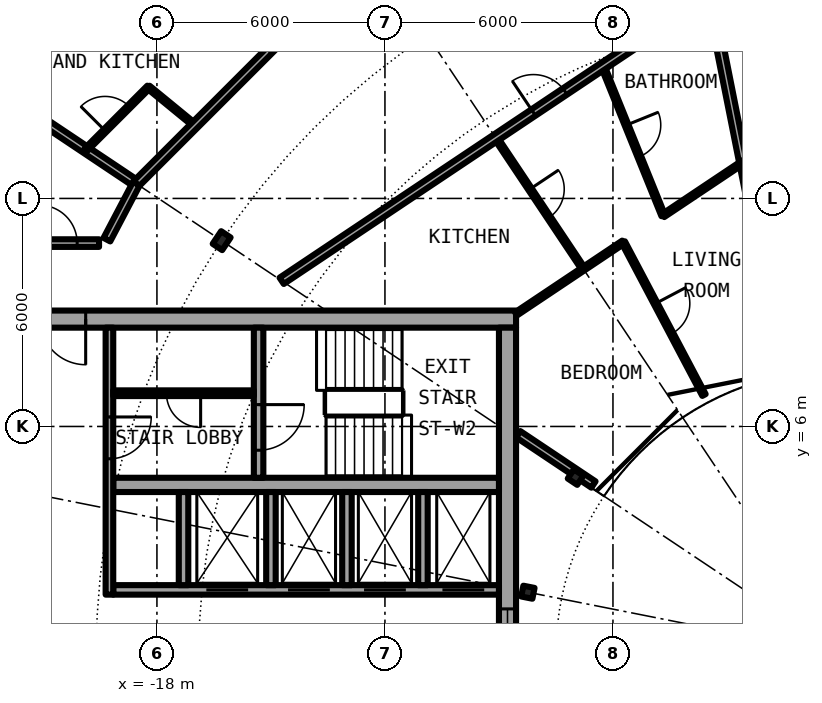
"""IFC4 building model, lengths in metres.
Left out: names, types, materials, properties, quantities, classifications, styles, units other than length and angle.
Written with IfcOpenShell. Run it as: python <this file> out.ifc"""

import sys

from ifc_helpers import new_model, si_unit, direction, frame, frame_2d, origin, origin_2d, place, context, subcontext, project, spatial, rectangle, i_section, extrude, element, fill, save


model = new_model("IFC4")
c1 = context("Model", 3, precision=1e-05, world=origin(), true_north=direction((0.0, 1.0)))
c2 = subcontext(c1, "Body", "Model", "MODEL_VIEW")
j1 = project(units=[si_unit("LENGTHUNIT", "METRE"), si_unit("PLANEANGLEUNIT", "RADIAN")], contexts=[c1])
p1 = place(None, origin())
s1 = spatial("IfcSite", under=j1, at=p1, CompositionType="ELEMENT")
p2 = place(p1, origin())
s2 = spatial("IfcBuilding", under=s1, at=p2, CompositionType="ELEMENT")
p3 = place(p2, frame((0.0, 0.0, 199.35)))
s3 = spatial("IfcBuildingStorey", under=s2, at=p3, CompositionType="ELEMENT", Elevation=199.35)
p4 = place(p3, frame((-16.297, 10.889, 0.0), z_axis=(0.0, 0.0, 1.0), x_axis=(-0.831469612303, 0.55557023302, 0.0)))
e1 = element("IfcColumn", 1, at=p4, inside=s3, PredefinedType="COLUMN", context=c2, shape_type="SweptSolid", body=[
    extrude(i_section(OverallWidth=0.3, OverallDepth=0.4, WebThickness=0.013, FlangeThickness=0.024, FilletRadius=0.027, at=origin_2d()), origin(), (0.0, 0.0, 1.0), 3.05),
])
for number, where, z_axis, x_axis in (
    (2, (-6.984, 4.667, 0.0), (0.0, 0.0, 1.0), (-0.831, 0.556, 0.0)),
    (3, (-8.239, 1.639, 0.0), (0.0, 0.0, 1.0), (-0.981, 0.195, 0.0)),
):
    element("IfcColumn", number, at=place(p3, frame(where, z_axis=z_axis, x_axis=x_axis)), inside=s3, PredefinedType="COLUMN", context=c2, shape_type="SweptSolid", body=[
        extrude(i_section(OverallWidth=0.3, OverallDepth=0.29, WebThickness=0.009, FlangeThickness=0.014, FilletRadius=0.027, at=origin_2d()), origin(), (0.0, 0.0, 1.0), 3.05),
    ])
p5 = place(p3, frame((-19.304, 19.304, 0.0), z_axis=(0.0, 0.0, 1.0), x_axis=(-0.634382322723, -0.773019449054, 0.0)))
e4 = element("IfcWall", 4, at=p5, inside=s3, PredefinedType="SOLIDWALL", context=c2, shape_type="SweptSolid", body=[
    extrude(rectangle(XDim=5.352, YDim=0.25, at=frame_2d((2.676, 0.0))), origin(), (0.0, 0.0, 1.0), 2.7),
])
p6 = place(p5, frame((0.441, 0.0, 0.3)))
e5 = element("IfcOpeningElement", 5, at=p6, cuts=e4, PredefinedType="OPENING", context=c2, shape_type="SweptSolid", body=[
    extrude(rectangle(XDim=1.8, YDim=2.1, at=frame_2d((0.9, 1.05))), frame((0.0, 0.135, 0.0), z_axis=(0.0, -1.0, 0.0), x_axis=(1.0, 0.0, 0.0)), (0.0, 0.0, 1.0), 0.27),
])
p7 = place(p5, frame((3.51, 0.0, 0.0)))
e6 = element("IfcOpeningElement", 6, at=p7, cuts=e4, PredefinedType="OPENING", context=c2, shape_type="SweptSolid", body=[
    extrude(rectangle(XDim=1.0, YDim=2.2, at=frame_2d((0.5, 1.1))), frame((0.0, 0.135, 0.0), z_axis=(0.0, -1.0, 0.0), x_axis=(1.0, 0.0, 0.0)), (0.0, 0.0, 1.0), 0.27),
])
p8 = place(p3, frame((-8.55, 8.825, 0.0), z_axis=(0.0, 0.0, 1.0), x_axis=(-1.0, 0.0, 0.0)))
e7 = element("IfcWall", 7, at=p8, inside=s3, PredefinedType="SHEAR", context=c2, shape_type="SweptSolid", body=[
    extrude(rectangle(XDim=13.5, YDim=0.45, at=frame_2d((6.75, 0.0))), origin(), (0.0, 0.0, 1.0), 3.05),
])
p9 = place(p8, frame((11.325, 0.0, 0.0)))
e8 = element("IfcOpeningElement", 8, at=p9, cuts=e7, PredefinedType="OPENING", context=c2, shape_type="SweptSolid", body=[
    extrude(rectangle(XDim=1.2, YDim=2.3, at=frame_2d((0.6, 1.15))), frame((0.0, 0.235, 0.0), z_axis=(0.0, -1.0, 0.0), x_axis=(1.0, 0.0, 0.0)), (0.0, 0.0, 1.0), 0.47),
])
p10 = place(p3, frame((-8.775, 8.6, 0.0), z_axis=(0.0, 0.0, 1.0), x_axis=(0.0, -1.0, 0.0)))
e9 = element("IfcWall", 9, at=p10, inside=s3, PredefinedType="SHEAR", context=c2, shape_type="SweptSolid", body=[
    extrude(rectangle(XDim=17.2, YDim=0.45, at=frame_2d((8.6, 0.0))), origin(), (0.0, 0.0, 1.0), 3.05),
])
p11 = place(p10, frame((7.4, 0.0, 0.1)))
e10 = element("IfcOpeningElement", 10, at=p11, cuts=e9, PredefinedType="OPENING", context=c2, shape_type="SweptSolid", body=[
    extrude(rectangle(XDim=2.4, YDim=2.2, at=frame_2d((1.2, 1.1))), frame((0.0, 0.235, 0.0), z_axis=(0.0, -1.0, 0.0), x_axis=(1.0, 0.0, 0.0)), (0.0, 0.0, 1.0), 0.47),
])
p12 = place(p3, frame((-9.0, 1.7, 0.0), z_axis=(0.0, 0.0, 1.0), x_axis=(-1.0, 0.0, 0.0)))
e11 = element("IfcWall", 11, at=p12, inside=s3, PredefinedType="SHEAR", context=c2, shape_type="SweptSolid", body=[
    extrude(rectangle(XDim=10.15, YDim=0.25, at=frame_2d((5.075, 0.0))), origin(), (0.0, 0.0, 1.0), 3.05),
])
p13 = place(p12, frame((0.387, 0.0, 0.0)))
e12 = element("IfcOpeningElement", 12, at=p13, cuts=e11, PredefinedType="OPENING", context=c2, shape_type="SweptSolid", body=[
    extrude(rectangle(XDim=1.1, YDim=2.3, at=frame_2d((0.55, 1.15))), frame((0.0, 0.135, 0.0), z_axis=(0.0, -1.0, 0.0), x_axis=(1.0, 0.0, 0.0)), (0.0, 0.0, 1.0), 0.27),
])
p14 = place(p12, frame((2.45, 0.0, 0.0)))
e13 = element("IfcOpeningElement", 13, at=p14, cuts=e11, PredefinedType="OPENING", context=c2, shape_type="SweptSolid", body=[
    extrude(rectangle(XDim=1.1, YDim=2.3, at=frame_2d((0.55, 1.15))), frame((0.0, 0.135, 0.0), z_axis=(0.0, -1.0, 0.0), x_axis=(1.0, 0.0, 0.0)), (0.0, 0.0, 1.0), 0.27),
])
p15 = place(p12, frame((4.45, 0.0, 0.0)))
e14 = element("IfcOpeningElement", 14, at=p15, cuts=e11, PredefinedType="OPENING", context=c2, shape_type="SweptSolid", body=[
    extrude(rectangle(XDim=1.1, YDim=2.3, at=frame_2d((0.55, 1.15))), frame((0.0, 0.135, 0.0), z_axis=(0.0, -1.0, 0.0), x_axis=(1.0, 0.0, 0.0)), (0.0, 0.0, 1.0), 0.27),
])
p16 = place(p12, frame((6.6, 0.0, 0.0)))
e15 = element("IfcOpeningElement", 15, at=p16, cuts=e11, PredefinedType="OPENING", context=c2, shape_type="SweptSolid", body=[
    extrude(rectangle(XDim=1.1, YDim=2.3, at=frame_2d((0.55, 1.15))), frame((0.0, 0.135, 0.0), z_axis=(0.0, -1.0, 0.0), x_axis=(1.0, 0.0, 0.0)), (0.0, 0.0, 1.0), 0.27),
])
p17 = place(p3, frame((-9.0, 4.462, 0.0), z_axis=(0.0, 0.0, 1.0), x_axis=(-1.0, 0.0, 0.0)))
e16 = element("IfcWall", 16, at=p17, inside=s3, PredefinedType="SHEAR", context=c2, shape_type="SweptSolid", body=[
    extrude(rectangle(XDim=10.15, YDim=0.375, at=frame_2d((5.075, 0.0))), origin(), (0.0, 0.0, 1.0), 3.05),
])
p18 = place(p3, frame((-15.325, 8.6, 0.0), z_axis=(0.0, 0.0, 1.0), x_axis=(0.0, -1.0, 0.0)))
e17 = element("IfcWall", 17, at=p18, inside=s3, PredefinedType="SHEAR", context=c2, shape_type="SweptSolid", body=[
    extrude(rectangle(XDim=3.95, YDim=0.25, at=frame_2d((1.975, 0.0))), origin(), (0.0, 0.0, 1.0), 3.05),
])
p19 = place(p18, frame((2.025, 0.0, 0.0)))
e18 = element("IfcOpeningElement", 18, at=p19, cuts=e17, PredefinedType="OPENING", context=c2, shape_type="SweptSolid", body=[
    extrude(rectangle(XDim=1.2, YDim=2.3, at=frame_2d((0.6, 1.15))), frame((0.0, 0.135, 0.0), z_axis=(0.0, -1.0, 0.0), x_axis=(1.0, 0.0, 0.0)), (0.0, 0.0, 1.0), 0.27),
])
for number, where, z_axis, x_axis in (
    (19, (-15.0, 1.825, 0.0), (0.0, 0.0, 1.0), (0.0, 1.0, 0.0)),
    (20, (-17.3, 1.825, 0.0), (0.0, 0.0, 1.0), (0.0, 1.0, 0.0)),
):
    element("IfcWall", number, at=place(p3, frame(where, z_axis=z_axis, x_axis=x_axis)), inside=s3, PredefinedType="SOLIDWALL", context=c2, shape_type="SweptSolid", body=[
        extrude(rectangle(XDim=2.45, YDim=0.25, at=frame_2d((1.225, 0.0))), origin(), (0.0, 0.0, 1.0), 2.7),
    ])
p20 = place(p3, frame((-19.25, 8.6, 0.0), z_axis=(0.0, 0.0, 1.0), x_axis=(0.0, -1.0, 0.0)))
e21 = element("IfcWall", 21, at=p20, inside=s3, PredefinedType="SOLIDWALL", context=c2, shape_type="SweptSolid", body=[
    extrude(rectangle(XDim=7.025, YDim=0.2, at=frame_2d((3.513, 0.0))), origin(), (0.0, 0.0, 1.0), 2.7),
])
p21 = place(p20, frame((2.35, 0.0, 0.0)))
e22 = element("IfcOpeningElement", 22, at=p21, cuts=e21, PredefinedType="OPENING", context=c2, shape_type="SweptSolid", body=[
    extrude(rectangle(XDim=1.1, YDim=2.3, at=frame_2d((0.55, 1.15))), frame((0.0, 0.11, 0.0), z_axis=(0.0, -1.0, 0.0), x_axis=(1.0, 0.0, 0.0)), (0.0, 0.0, 1.0), 0.22),
])
for number, where, z_axis, x_axis in (
    (23, (-11.0, 1.825, 0.0), (0.0, 0.0, 1.0), (0.0, 1.0, 0.0)),
    (24, (-13.0, 1.825, 0.0), (0.0, 0.0, 1.0), (0.0, 1.0, 0.0)),
):
    element("IfcWall", number, at=place(p3, frame(where, z_axis=z_axis, x_axis=x_axis)), inside=s3, PredefinedType="SOLIDWALL", context=c2, shape_type="SweptSolid", body=[
        extrude(rectangle(XDim=2.45, YDim=0.25, at=frame_2d((1.225, 0.0))), origin(), (0.0, 0.0, 1.0), 2.7),
    ])
p22 = place(p3, frame((-15.45, 6.875, 0.0), z_axis=(0.0, 0.0, 1.0), x_axis=(-1.0, 0.0, 0.0)))
e25 = element("IfcWall", 25, at=p22, inside=s3, PredefinedType="PARTITIONING", context=c2, shape_type="SweptSolid", body=[
    extrude(rectangle(XDim=3.7, YDim=0.15, at=frame_2d((1.85, 0.0))), origin(), (0.0, 0.0, 1.0), 2.7),
])
p23 = place(p22, frame((1.4, 0.0, 0.0)))
e26 = element("IfcOpeningElement", 26, at=p23, cuts=e25, PredefinedType="OPENING", context=c2, shape_type="SweptSolid", body=[
    extrude(rectangle(XDim=0.9, YDim=2.3, at=frame_2d((0.45, 1.15))), frame((0.0, 0.085, 0.0), z_axis=(0.0, -1.0, 0.0), x_axis=(1.0, 0.0, 0.0)), (0.0, 0.0, 1.0), 0.17),
])
p24 = place(p3, frame((-18.224, 14.927, 0.0), z_axis=(0.0, 0.0, 1.0), x_axis=(0.773446828454, -0.633861186344, 0.0)))
e27 = element("IfcWall", 27, at=p24, inside=s3, PredefinedType="PARTITIONING", context=c2, shape_type="SweptSolid", body=[
    extrude(rectangle(XDim=1.578, YDim=0.1, at=frame_2d((0.789, 0.0))), origin(), (0.0, 0.0, 1.0), 2.7),
])
p25 = place(p3, frame((-22.595, 15.098, 0.0), z_axis=(0.0, 0.0, 1.0), x_axis=(0.831387096605, -0.55569370664, 0.0)))
e28 = element("IfcWall", 28, at=p25, inside=s3, PredefinedType="PARTITIONING", context=c2, shape_type="SweptSolid", body=[
    extrude(rectangle(XDim=4.875, YDim=0.2, at=frame_2d((2.438, 0.0))), origin(), (0.0, 0.0, 1.0), 2.7),
])
p26 = place(p3, frame((-9.085, 13.597, 0.0), z_axis=(0.0, 0.0, 1.0), x_axis=(0.555528237031, -0.831497671591, 0.0)))
e29 = element("IfcWall", 29, at=p26, inside=s3, PredefinedType="PARTITIONING", context=c2, shape_type="SweptSolid", body=[
    extrude(rectangle(XDim=4.149, YDim=0.1, at=frame_2d((2.075, 0.0))), origin(), (0.0, 0.0, 1.0), 2.7),
])
p27 = place(p26, frame((1.625, 0.0, 0.0)))
e30 = element("IfcOpeningElement", 30, at=p27, cuts=e29, PredefinedType="OPENING", context=c2, shape_type="SweptSolid", body=[
    extrude(rectangle(XDim=0.9, YDim=2.3, at=frame_2d((0.45, 1.15))), frame((0.0, 0.06, 0.0), z_axis=(0.0, -1.0, 0.0), x_axis=(1.0, 0.0, 0.0)), (0.0, 0.0, 1.0), 0.12),
])
p28 = place(p3, frame((-6.269, 15.478, 0.0), z_axis=(0.0, 0.0, 1.0), x_axis=(0.375509828455, -0.926818411952, 0.0)))
e31 = element("IfcWall", 31, at=p28, inside=s3, PredefinedType="PARTITIONING", context=c2, shape_type="SweptSolid", body=[
    extrude(rectangle(XDim=4.237, YDim=0.1, at=frame_2d((2.119, 0.0))), origin(), (0.0, 0.0, 1.0), 2.7),
])
p29 = place(p28, frame((1.669, 0.0, 0.0)))
e32 = element("IfcOpeningElement", 32, at=p29, cuts=e31, PredefinedType="OPENING", context=c2, shape_type="SweptSolid", body=[
    extrude(rectangle(XDim=0.9, YDim=2.3, at=frame_2d((0.45, 1.15))), frame((0.0, 0.06, 0.0), z_axis=(0.0, -1.0, 0.0), x_axis=(1.0, 0.0, 0.0)), (0.0, 0.0, 1.0), 0.12),
])
p30 = place(p3, frame((-5.729, 10.849, 0.0), z_axis=(0.0, 0.0, 1.0), x_axis=(0.466962677975, -0.884277025246, 0.0)))
e33 = element("IfcWall", 33, at=p30, inside=s3, PredefinedType="PARTITIONING", context=c2, shape_type="SweptSolid", body=[
    extrude(rectangle(XDim=4.549, YDim=0.1, at=frame_2d((2.274, 0.0))), origin(), (0.0, 0.0, 1.0), 2.7),
])
p31 = place(p30, frame((1.824, 0.0, 0.0)))
e34 = element("IfcOpeningElement", 34, at=p31, cuts=e33, PredefinedType="OPENING", context=c2, shape_type="SweptSolid", body=[
    extrude(rectangle(XDim=0.9, YDim=2.3, at=frame_2d((0.45, 1.15))), frame((0.0, 0.06, 0.0), z_axis=(0.0, -1.0, 0.0), x_axis=(1.0, 0.0, 0.0)), (0.0, 0.0, 1.0), 0.12),
])
p32 = place(p3, frame((-3.457, 17.359, 0.0), z_axis=(0.0, 0.0, 1.0), x_axis=(0.195203214616, -0.980762817915, 0.0)))
e35 = element("IfcWall", 35, at=p32, inside=s3, PredefinedType="PARTITIONING", context=c2, shape_type="SweptSolid", body=[
    extrude(rectangle(XDim=9.155, YDim=0.2, at=frame_2d((4.578, 0.0))), origin(), (0.0, 0.0, 1.0), 2.7),
])
p33 = place(p3, frame((-6.513, 4.472, 0.0), z_axis=(0.0, 0.0, 1.0), x_axis=(-0.831403409976, 0.555669299026, 0.0)))
e36 = element("IfcWall", 36, at=p33, inside=s3, PredefinedType="PARTITIONING", context=c2, shape_type="SweptSolid", body=[
    extrude(rectangle(XDim=2.383, YDim=0.2, at=frame_2d((1.191, 0.0))), origin(), (0.0, 0.0, 1.0), 2.7),
])
p34 = place(p3, frame((-21.675, 10.825, 0.0), z_axis=(0.0, 0.0, 1.0), x_axis=(1.0, 0.0, 0.0)))
e37 = element("IfcWall", 37, at=p34, inside=s3, PredefinedType="PARTITIONING", context=c2, shape_type="SweptSolid", body=[
    extrude(rectangle(XDim=2.152, YDim=0.2, at=frame_2d((1.076, 0.0))), origin(), (0.0, 0.0, 1.0), 2.7),
])
p35 = place(p34, frame((0.576, 0.0, 0.0)))
e38 = element("IfcOpeningElement", 38, at=p35, cuts=e37, PredefinedType="OPENING", context=c2, shape_type="SweptSolid", body=[
    extrude(rectangle(XDim=1.0, YDim=2.3, at=frame_2d((0.5, 1.15))), frame((0.0, 0.11, 0.0), z_axis=(0.0, -1.0, 0.0), x_axis=(1.0, 0.0, 0.0)), (0.0, 0.0, 1.0), 0.22),
])
p36 = place(p3, frame((-8.55, 8.963, 0.0), z_axis=(0.0, 0.0, 1.0), x_axis=(0.83129689803, 0.555828631257, 0.0)))
e39 = element("IfcWall", 39, at=p36, inside=s3, PredefinedType="PARTITIONING", context=c2, shape_type="SweptSolid", body=[
    extrude(rectangle(XDim=3.394, YDim=0.1, at=frame_2d((1.697, 0.0))), origin(), (0.0, 0.0, 1.0), 2.7),
])
p37 = place(p3, frame((-4.678, 11.551, 0.0), z_axis=(0.0, 0.0, 1.0), x_axis=(0.831440395268, 0.555613956912, 0.0)))
e40 = element("IfcWall", 40, at=p37, inside=s3, PredefinedType="PARTITIONING", context=c2, shape_type="SweptSolid", body=[
    extrude(rectangle(XDim=2.527, YDim=0.1, at=frame_2d((1.264, 0.0))), origin(), (0.0, 0.0, 1.0), 2.7),
])
p38 = place(p3, frame((-14.718, 9.832, 0.0), z_axis=(0.0, 0.0, 1.0), x_axis=(0.831437137577, 0.555618831806, 0.0)))
e41 = element("IfcWall", 41, at=p38, inside=s3, PredefinedType="PARTITIONING", context=c2, shape_type="SweptSolid", body=[
    extrude(rectangle(XDim=13.549, YDim=0.2, at=frame_2d((6.774, 0.0))), origin(), (0.0, 0.0, 1.0), 2.7),
])
p39 = place(p38, frame((7.968, 0.0, 0.0)))
e42 = element("IfcOpeningElement", 42, at=p39, cuts=e41, PredefinedType="OPENING", context=c2, shape_type="SweptSolid", body=[
    extrude(rectangle(XDim=1.0, YDim=2.3, at=frame_2d((0.5, 1.15))), frame((0.0, 0.11, 0.0), z_axis=(0.0, -1.0, 0.0), x_axis=(1.0, 0.0, 0.0)), (0.0, 0.0, 1.0), 0.22),
])
p40 = place(p3, frame((-18.542, 12.389, 0.0), z_axis=(0.0, 0.0, 1.0), x_axis=(0.707106781187, 0.707106781187, 0.0)))
e43 = element("IfcWall", 43, at=p40, inside=s3, PredefinedType="PARTITIONING", context=c2, shape_type="SweptSolid", body=[
    extrude(rectangle(XDim=8.702, YDim=0.2, at=frame_2d((4.351, 0.0))), origin(), (0.0, 0.0, 1.0), 2.7),
])
p41 = place(p40, frame((4.938, 0.0, 0.0)))
e44 = element("IfcOpeningElement", 44, at=p41, cuts=e43, PredefinedType="OPENING", context=c2, shape_type="SweptSolid", body=[
    extrude(rectangle(XDim=1.0, YDim=2.3, at=frame_2d((0.5, 1.15))), frame((0.0, 0.11, 0.0), z_axis=(0.0, -1.0, 0.0), x_axis=(1.0, 0.0, 0.0)), (0.0, 0.0, 1.0), 0.22),
])
p42 = place(p3, frame((-19.317, 10.915, 0.0), z_axis=(0.0, 0.0, 1.0), x_axis=(0.465359652486, 0.885121683068, 0.0)))
e45 = element("IfcWall", 45, at=p42, inside=s3, PredefinedType="PARTITIONING", context=c2, shape_type="SweptSolid", body=[
    extrude(rectangle(XDim=1.665, YDim=0.2, at=frame_2d((0.833, 0.0))), origin(), (0.0, 0.0, 1.0), 2.7),
])
p43 = place(p3, frame((-19.867, 13.283, 0.0), z_axis=(0.0, 0.0, 1.0), x_axis=(0.707106781187, 0.707106781187, 0.0)))
e46 = element("IfcWall", 46, at=p43, inside=s3, PredefinedType="PARTITIONING", context=c2, shape_type="SweptSolid", body=[
    extrude(rectangle(XDim=2.332, YDim=0.1, at=frame_2d((1.166, 0.0))), origin(), (0.0, 0.0, 1.0), 2.7),
])
p44 = place(p43, frame((0.709, 0.0, 0.0)))
e47 = element("IfcOpeningElement", 47, at=p44, cuts=e46, PredefinedType="OPENING", context=c2, shape_type="SweptSolid", body=[
    extrude(rectangle(XDim=0.9, YDim=2.3, at=frame_2d((0.45, 1.15))), frame((0.0, 0.06, 0.0), z_axis=(0.0, -1.0, 0.0), x_axis=(1.0, 0.0, 0.0)), (0.0, 0.0, 1.0), 0.12),
])
p45 = place(p13, origin())
e48 = element("IfcDoor", 48, at=p45, inside=s3, OperationType="DOUBLE_DOOR_SLIDING", PredefinedType="DOOR", context=c2, shape_type="SweptSolid", body=[
    extrude(rectangle(XDim=1.1, YDim=2.3, at=frame_2d((0.55, 1.15))), frame((0.0, 0.025, 0.0), z_axis=(0.0, -1.0, 0.0), x_axis=(1.0, 0.0, 0.0)), (0.0, 0.0, 1.0), 0.05),
])
fill(e12, e48)
p46 = place(p14, origin())
e49 = element("IfcDoor", 49, at=p46, inside=s3, OperationType="DOUBLE_DOOR_SLIDING", PredefinedType="DOOR", context=c2, shape_type="SweptSolid", body=[
    extrude(rectangle(XDim=1.1, YDim=2.3, at=frame_2d((0.55, 1.15))), frame((0.0, 0.025, 0.0), z_axis=(0.0, -1.0, 0.0), x_axis=(1.0, 0.0, 0.0)), (0.0, 0.0, 1.0), 0.05),
])
fill(e13, e49)
p47 = place(p15, origin())
e50 = element("IfcDoor", 50, at=p47, inside=s3, OperationType="DOUBLE_DOOR_SLIDING", PredefinedType="DOOR", context=c2, shape_type="SweptSolid", body=[
    extrude(rectangle(XDim=1.1, YDim=2.3, at=frame_2d((0.55, 1.15))), frame((0.0, 0.025, 0.0), z_axis=(0.0, -1.0, 0.0), x_axis=(1.0, 0.0, 0.0)), (0.0, 0.0, 1.0), 0.05),
])
fill(e14, e50)
p48 = place(p16, origin())
e51 = element("IfcDoor", 51, at=p48, inside=s3, OperationType="DOUBLE_DOOR_SLIDING", PredefinedType="DOOR", context=c2, shape_type="SweptSolid", body=[
    extrude(rectangle(XDim=1.1, YDim=2.3, at=frame_2d((0.55, 1.15))), frame((0.0, 0.025, 0.0), z_axis=(0.0, -1.0, 0.0), x_axis=(1.0, 0.0, 0.0)), (0.0, 0.0, 1.0), 0.05),
])
fill(e15, e51)
p49 = place(p23, origin())
e52 = element("IfcDoor", 52, at=p49, inside=s3, OperationType="SINGLE_SWING_LEFT", PredefinedType="DOOR", context=c2, shape_type="SweptSolid", body=[
    extrude(rectangle(XDim=0.9, YDim=2.3, at=frame_2d((0.45, 1.15))), frame((0.0, 0.025, 0.0), z_axis=(0.0, -1.0, 0.0), x_axis=(1.0, 0.0, 0.0)), (0.0, 0.0, 1.0), 0.05),
])
fill(e26, e52)
p50 = place(p19, origin())
e53 = element("IfcDoor", 53, at=p50, inside=s3, OperationType="SINGLE_SWING_LEFT", PredefinedType="DOOR", context=c2, shape_type="SweptSolid", body=[
    extrude(rectangle(XDim=1.2, YDim=2.3, at=frame_2d((0.6, 1.15))), frame((0.0, 0.025, 0.0), z_axis=(0.0, -1.0, 0.0), x_axis=(1.0, 0.0, 0.0)), (0.0, 0.0, 1.0), 0.05),
])
fill(e18, e53)
p51 = place(p21, origin())
e54 = element("IfcDoor", 54, at=p51, inside=s3, OperationType="SINGLE_SWING_RIGHT", PredefinedType="DOOR", context=c2, shape_type="SweptSolid", body=[
    extrude(rectangle(XDim=1.1, YDim=2.3, at=frame_2d((0.55, 1.15))), frame((0.0, 0.025, 0.0), z_axis=(0.0, -1.0, 0.0), x_axis=(1.0, 0.0, 0.0)), (0.0, 0.0, 1.0), 0.05),
])
fill(e22, e54)
p52 = place(p9, origin())
e55 = element("IfcDoor", 55, at=p52, inside=s3, OperationType="SINGLE_SWING_LEFT", PredefinedType="DOOR", context=c2, shape_type="SweptSolid", body=[
    extrude(rectangle(XDim=1.2, YDim=2.3, at=frame_2d((0.6, 1.15))), frame((0.0, 0.025, 0.0), z_axis=(0.0, -1.0, 0.0), x_axis=(1.0, 0.0, 0.0)), (0.0, 0.0, 1.0), 0.05),
])
fill(e8, e55)
p53 = place(p11, origin())
e56 = element("IfcWindow", 56, at=p53, inside=s3, PartitioningType="SINGLE_PANEL", PredefinedType="WINDOW", context=c2, shape_type="SweptSolid", body=[
    extrude(rectangle(XDim=2.4, YDim=2.2, at=frame_2d((1.2, 1.1))), frame((0.0, 0.03, 0.0), z_axis=(0.0, -1.0, 0.0), x_axis=(1.0, 0.0, 0.0)), (0.0, 0.0, 1.0), 0.06),
])
fill(e10, e56)
p54 = place(p44, origin())
e57 = element("IfcDoor", 57, at=p54, inside=s3, OperationType="SINGLE_SWING_LEFT", PredefinedType="DOOR", context=c2, shape_type="SweptSolid", body=[
    extrude(rectangle(XDim=0.9, YDim=2.3, at=frame_2d((0.45, 1.15))), frame((0.0, 0.025, 0.0), z_axis=(0.0, -1.0, 0.0), x_axis=(1.0, 0.0, 0.0)), (0.0, 0.0, 1.0), 0.05),
])
fill(e47, e57)
p55 = place(p39, origin())
e58 = element("IfcDoor", 58, at=p55, inside=s3, OperationType="SINGLE_SWING_RIGHT", PredefinedType="DOOR", context=c2, shape_type="SweptSolid", body=[
    extrude(rectangle(XDim=1.0, YDim=2.3, at=frame_2d((0.5, 1.15))), frame((0.0, 0.025, 0.0), z_axis=(0.0, -1.0, 0.0), x_axis=(1.0, 0.0, 0.0)), (0.0, 0.0, 1.0), 0.05),
])
fill(e42, e58)
p56 = place(p29, origin())
e59 = element("IfcDoor", 59, at=p56, inside=s3, OperationType="SINGLE_SWING_LEFT", PredefinedType="DOOR", context=c2, shape_type="SweptSolid", body=[
    extrude(rectangle(XDim=0.9, YDim=2.3, at=frame_2d((0.45, 1.15))), frame((0.0, 0.025, 0.0), z_axis=(0.0, -1.0, 0.0), x_axis=(1.0, 0.0, 0.0)), (0.0, 0.0, 1.0), 0.05),
])
fill(e32, e59)
p57 = place(p27, origin())
e60 = element("IfcDoor", 60, at=p57, inside=s3, OperationType="SINGLE_SWING_LEFT", PredefinedType="DOOR", context=c2, shape_type="SweptSolid", body=[
    extrude(rectangle(XDim=0.9, YDim=2.3, at=frame_2d((0.45, 1.15))), frame((0.0, 0.025, 0.0), z_axis=(0.0, -1.0, 0.0), x_axis=(1.0, 0.0, 0.0)), (0.0, 0.0, 1.0), 0.05),
])
fill(e30, e60)
p58 = place(p31, origin())
e61 = element("IfcDoor", 61, at=p58, inside=s3, OperationType="SINGLE_SWING_RIGHT", PredefinedType="DOOR", context=c2, shape_type="SweptSolid", body=[
    extrude(rectangle(XDim=0.9, YDim=2.3, at=frame_2d((0.45, 1.15))), frame((0.0, 0.025, 0.0), z_axis=(0.0, -1.0, 0.0), x_axis=(1.0, 0.0, 0.0)), (0.0, 0.0, 1.0), 0.05),
])
fill(e34, e61)
p59 = place(p35, origin())
e62 = element("IfcDoor", 62, at=p59, inside=s3, OperationType="SINGLE_SWING_LEFT", PredefinedType="DOOR", context=c2, shape_type="SweptSolid", body=[
    extrude(rectangle(XDim=1.0, YDim=2.3, at=frame_2d((0.5, 1.15))), frame((0.0, 0.025, 0.0), z_axis=(0.0, -1.0, 0.0), x_axis=(1.0, 0.0, 0.0)), (0.0, 0.0, 1.0), 0.05),
])
fill(e38, e62)
save(model, sys.argv[1])
